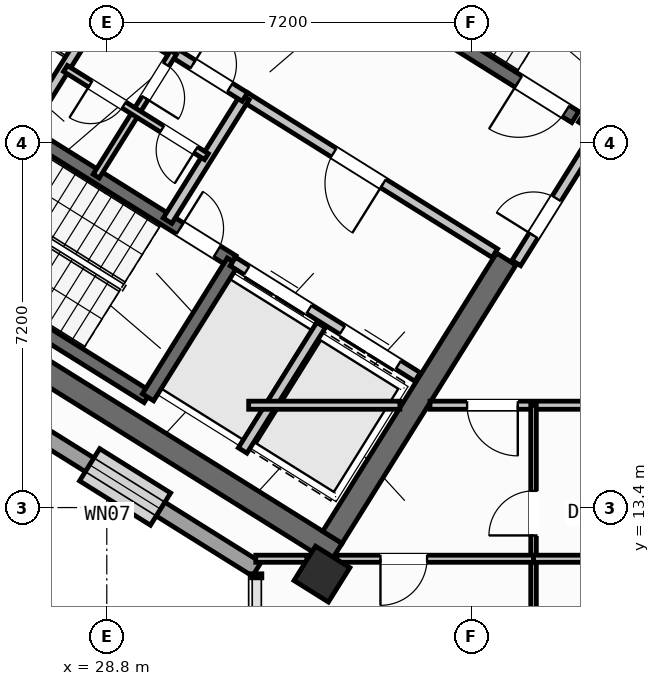
"""IFC4 building model, lengths in metres.
Left out: names, types, materials, properties, quantities, classifications, styles, units other than length and angle.
Written with IfcOpenShell. Run it as: python <this file> out.ifc"""

import sys

from ifc_helpers import new_model, si_unit, direction, frame, frame_2d, origin, origin_2d, place, context, subcontext, project, spatial, rectangle, hollow_rectangle, extrude, source, transform, mapped, element, fill, save


model = new_model("IFC4")
c1 = context("Model", 3, precision=1e-05, world=origin(), true_north=direction((0.0, 1.0)))
c2 = subcontext(c1, "Body", "Model", "MODEL_VIEW")
j1 = project(units=[si_unit("LENGTHUNIT", "METRE"), si_unit("PLANEANGLEUNIT", "RADIAN")], contexts=[c1])
p1 = place(None, origin())
s1 = spatial("IfcSite", under=j1, at=p1, CompositionType="ELEMENT")
p2 = place(p1, origin())
s2 = spatial("IfcBuilding", under=s1, at=p2, CompositionType="ELEMENT")
p3 = place(p2, frame((0.0, 0.0, 218.4)))
s3 = spatial("IfcBuildingStorey", under=s2, at=p3, CompositionType="ELEMENT", Elevation=218.4)
p4 = place(p3, frame((33.324, 12.503, 0.0), z_axis=(0.0, 0.0, 1.0), x_axis=(-0.848043529849, 0.529926571782, 0.0)))
e1 = element("IfcWall", 1, at=p4, inside=s3, PredefinedType="SHEAR", context=c2, shape_type="SweptSolid", body=[
    extrude(rectangle(XDim=13.04, YDim=0.45, at=frame_2d((6.52, 0.0))), origin(), (0.0, 0.0, 1.0), 3.35),
])
p5 = place(p3, frame((40.221, 23.965, 0.0), z_axis=(0.0, 0.0, 1.0), x_axis=(-0.529902075036, -0.848058836916, 0.0)))
e2 = element("IfcWall", 2, at=p5, inside=s3, PredefinedType="SHEAR", context=c2, shape_type="SweptSolid", body=[
    extrude(rectangle(XDim=3.625, YDim=0.45, at=frame_2d((1.812, 0.0))), origin(), (0.0, 0.0, 1.0), 3.35),
])
p6 = place(p3, frame((36.683, 18.304, 0.0), z_axis=(0.0, 0.0, 1.0), x_axis=(-0.529904039071, -0.848057609704, 0.0)))
e3 = element("IfcWall", 3, at=p6, inside=s3, PredefinedType="SHEAR", context=c2, shape_type="SweptSolid", body=[
    extrude(rectangle(XDim=6.475, YDim=0.45, at=frame_2d((3.238, 0.0))), origin(), (0.0, 0.0, 1.0), 3.35),
])
m1 = source(origin(), c2, "Body", "SweptSolid", [
    extrude(hollow_rectangle(XDim=0.8, YDim=0.8, WallThickness=0.032, at=origin_2d()), origin(), (0.0, 0.0, 1.0), 3.6),
])
p7 = place(p3, frame((33.046, 12.087, 0.0), z_axis=(0.0, 0.0, 1.0), x_axis=(-0.848048096156, 0.529919264233, 0.0)))
e4 = element("IfcColumn", 4, at=p7, inside=s3, PredefinedType="COLUMN", context=c2, shape_type="MappedRepresentation", body=[
    mapped(m1, transform((0.0, 0.0, 0.0), scale=1.0)),
])
p8 = place(p3, frame((31.76, 12.183, 0.0), z_axis=(0.0, 0.0, 1.0), x_axis=(-0.848047074256, 0.529920899612, 0.0)))
e5 = element("IfcWall", 5, at=p8, inside=s3, PredefinedType="STANDARD", context=c2, shape_type="SweptSolid", body=[
    extrude(rectangle(XDim=30.652, YDim=0.32, at=frame_2d((15.326, 0.0))), origin(), (0.0, 0.0, 1.0), 3.35),
])
p9 = place(p8, frame((15.166, 0.0, 0.0)))
e6 = element("IfcOpeningElement", 6, at=p9, cuts=e5, PredefinedType="OPENING", context=c2, shape_type="SweptSolid", body=[
    extrude(rectangle(XDim=1.2, YDim=2.15, at=frame_2d((0.6, 1.075))), frame((0.0, 0.17, 0.0), z_axis=(0.0, -1.0, 0.0), x_axis=(1.0, 0.0, 0.0)), (0.0, 0.0, 1.0), 0.34),
])
p10 = place(p8, frame((2.24, 0.0, 0.9)))
e7 = element("IfcOpeningElement", 7, at=p10, cuts=e5, PredefinedType="OPENING", context=c2, shape_type="SweptSolid", body=[
    extrude(rectangle(XDim=1.65, YDim=1.45, at=frame_2d((0.825, 0.725))), frame((0.0, 0.17, 0.0), z_axis=(0.0, -1.0, 0.0), x_axis=(1.0, 0.0, 0.0)), (0.0, 0.0, 1.0), 0.34),
])
p11 = place(p8, frame((7.469, 0.0, 0.9)))
e8 = element("IfcOpeningElement", 8, at=p11, cuts=e5, PredefinedType="OPENING", context=c2, shape_type="SweptSolid", body=[
    extrude(rectangle(XDim=1.65, YDim=1.45, at=frame_2d((0.825, 0.725))), frame((0.0, 0.17, 0.0), z_axis=(0.0, -1.0, 0.0), x_axis=(1.0, 0.0, 0.0)), (0.0, 0.0, 1.0), 0.34),
])
p12 = place(p8, frame((12.623, 0.0, 1.0)))
e9 = element("IfcOpeningElement", 9, at=p12, cuts=e5, PredefinedType="OPENING", context=c2, shape_type="SweptSolid", body=[
    extrude(rectangle(XDim=0.9, YDim=1.25, at=frame_2d((0.45, 0.625))), frame((0.0, 0.17, 0.0), z_axis=(0.0, -1.0, 0.0), x_axis=(1.0, 0.0, 0.0)), (0.0, 0.0, 1.0), 0.34),
])
p13 = place(p8, frame((19.583, 0.0, 1.0)))
e10 = element("IfcOpeningElement", 10, at=p13, cuts=e5, PredefinedType="OPENING", context=c2, shape_type="SweptSolid", body=[
    extrude(rectangle(XDim=0.9, YDim=1.25, at=frame_2d((0.45, 0.625))), frame((0.0, 0.17, 0.0), z_axis=(0.0, -1.0, 0.0), x_axis=(1.0, 0.0, 0.0)), (0.0, 0.0, 1.0), 0.34),
])
p14 = place(p8, frame((22.033, 0.0, 1.0)))
e11 = element("IfcOpeningElement", 11, at=p14, cuts=e5, PredefinedType="OPENING", context=c2, shape_type="SweptSolid", body=[
    extrude(rectangle(XDim=0.9, YDim=1.25, at=frame_2d((0.45, 0.625))), frame((0.0, 0.17, 0.0), z_axis=(0.0, -1.0, 0.0), x_axis=(1.0, 0.0, 0.0)), (0.0, 0.0, 1.0), 0.34),
])
p15 = place(p8, frame((27.666, 0.0, 0.9)))
e12 = element("IfcOpeningElement", 12, at=p15, cuts=e5, PredefinedType="OPENING", context=c2, shape_type="SweptSolid", body=[
    extrude(rectangle(XDim=1.35, YDim=1.45, at=frame_2d((0.675, 0.725))), frame((0.0, 0.17, 0.0), z_axis=(0.0, -1.0, 0.0), x_axis=(1.0, 0.0, 0.0)), (0.0, 0.0, 1.0), 0.34),
])
p16 = place(p3, frame((29.605, 15.581, 0.0), z_axis=(0.0, 0.0, 1.0), x_axis=(-0.848036911448, 0.529937163087, 0.0)))
e13 = element("IfcWall", 13, at=p16, inside=s3, PredefinedType="SHEAR", context=c2, shape_type="SweptSolid", body=[
    extrude(rectangle(XDim=7.46, YDim=0.26, at=frame_2d((3.73, 0.0))), origin(), (0.0, 0.0, 1.0), 3.35),
])
p17 = place(p3, frame((31.28, 18.261, 0.0), z_axis=(0.0, 0.0, 1.0), x_axis=(-0.848051618787, 0.529913626805, 0.0)))
e14 = element("IfcWall", 14, at=p17, inside=s3, PredefinedType="SHEAR", context=c2, shape_type="SweptSolid", body=[
    extrude(rectangle(XDim=7.46, YDim=0.26, at=frame_2d((3.73, 0.0))), origin(), (0.0, 0.0, 1.0), 3.35),
])
p18 = place(p17, frame((0.36, 0.0, 0.0)))
e15 = element("IfcOpeningElement", 15, at=p18, cuts=e14, PredefinedType="OPENING", context=c2, shape_type="SweptSolid", body=[
    extrude(rectangle(XDim=0.86, YDim=2.05, at=frame_2d((0.43, 1.025))), frame((0.0, 0.14, 0.0), z_axis=(0.0, -1.0, 0.0), x_axis=(1.0, 0.0, 0.0)), (0.0, 0.0, 1.0), 0.28),
])
p19 = place(p3, frame((31.288, 18.256, 0.0), z_axis=(0.0, 0.0, 1.0), x_axis=(-0.529943379326, -0.848033026897, 0.0)))
e16 = element("IfcWall", 16, at=p19, inside=s3, PredefinedType="SHEAR", context=c2, shape_type="SweptSolid", body=[
    extrude(rectangle(XDim=3.16, YDim=0.26, at=frame_2d((1.58, 0.0))), origin(), (0.0, 0.0, 1.0), 3.35),
])
p20 = place(p3, frame((38.046, 21.108, 0.0), z_axis=(0.0, 0.0, 1.0), x_axis=(-0.848054434086, 0.529909121291, 0.0)))
e17 = element("IfcWall", 17, at=p20, inside=s3, PredefinedType="SHEAR", context=c2, shape_type="SweptSolid", body=[
    extrude(rectangle(XDim=7.33, YDim=0.26, at=frame_2d((3.665, 0.0))), origin(), (0.0, 0.0, 1.0), 3.35),
])
p21 = place(p20, frame((0.22, 0.0, 0.0)))
e18 = element("IfcOpeningElement", 18, at=p21, cuts=e17, PredefinedType="OPENING", context=c2, shape_type="SweptSolid", body=[
    extrude(rectangle(XDim=1.1, YDim=2.1, at=frame_2d((0.55, 1.05))), frame((0.0, 0.14, 0.0), z_axis=(0.0, -1.0, 0.0), x_axis=(1.0, 0.0, 0.0)), (0.0, 0.0, 1.0), 0.28),
])
p22 = place(p3, frame((34.933, 15.978, 0.0), z_axis=(0.0, 0.0, 1.0), x_axis=(-0.848055739377, 0.529907032327, 0.0)))
e19 = element("IfcWall", 19, at=p22, inside=s3, PredefinedType="STANDARD", context=c2, shape_type="SweptSolid", body=[
    extrude(rectangle(XDim=4.298, YDim=0.2, at=frame_2d((2.149, 0.0))), origin(), (0.0, 0.0, 1.0), 3.34),
])
p23 = place(p22, frame((0.448, 0.0, 0.0)))
e20 = element("IfcOpeningElement", 20, at=p23, cuts=e19, PredefinedType="OPENING", context=c2, shape_type="SweptSolid", body=[
    extrude(rectangle(XDim=1.3, YDim=2.2, at=frame_2d((0.65, 1.1))), frame((0.0, 0.11, 0.0), z_axis=(0.0, -1.0, 0.0), x_axis=(1.0, 0.0, 0.0)), (0.0, 0.0, 1.0), 0.22),
])
p24 = place(p22, frame((2.523, 0.0, 0.0)))
e21 = element("IfcOpeningElement", 21, at=p24, cuts=e19, PredefinedType="OPENING", context=c2, shape_type="SweptSolid", body=[
    extrude(rectangle(XDim=1.45, YDim=2.25, at=frame_2d((0.725, 1.125))), frame((0.0, 0.11, 0.0), z_axis=(0.0, -1.0, 0.0), x_axis=(1.0, 0.0, 0.0)), (0.0, 0.0, 1.0), 0.22),
])
p25 = place(p3, frame((36.459, 18.421, 0.0), z_axis=(0.0, 0.0, 1.0), x_axis=(-0.848059591691, 0.529900867089, 0.0)))
e22 = element("IfcWall", 22, at=p25, inside=s3, PredefinedType="STANDARD", context=c2, shape_type="SweptSolid", body=[
    extrude(rectangle(XDim=5.818, YDim=0.2, at=frame_2d((2.909, 0.0))), origin(), (0.0, 0.0, 1.0), 3.34),
])
p26 = place(p25, frame((2.598, 0.0, 0.0)))
e23 = element("IfcOpeningElement", 23, at=p26, cuts=e22, PredefinedType="OPENING", context=c2, shape_type="SweptSolid", body=[
    extrude(rectangle(XDim=1.15, YDim=2.1, at=frame_2d((0.575, 1.05))), frame((0.0, 0.11, 0.0), z_axis=(0.0, -1.0, 0.0), x_axis=(1.0, 0.0, 0.0)), (0.0, 0.0, 1.0), 0.22),
])
p27 = place(p3, frame((33.029, 17.003, 0.0), z_axis=(0.0, 0.0, 1.0), x_axis=(-0.529916267533, -0.848049968695, 0.0)))
e24 = element("IfcWall", 24, at=p27, inside=s3, PredefinedType="STANDARD", context=c2, shape_type="SweptSolid", body=[
    extrude(rectangle(XDim=2.92, YDim=0.2, at=frame_2d((1.46, 0.0))), origin(), (0.0, 0.0, 1.0), 3.34),
])
for number, where, z_axis, x_axis in (
    (25, (31.525, 21.504, 0.0), (0.0, 0.0, 1.0), (-0.53, -0.848, 0.0)),
    (26, (28.71, 23.263, 0.0), (0.0, 0.0, 1.0), (-0.53, -0.848, 0.0)),
):
    element("IfcWall", number, at=place(p3, frame(where, z_axis=z_axis, x_axis=x_axis)), inside=s3, PredefinedType="STANDARD", context=c2, shape_type="SweptSolid", body=[
        extrude(rectangle(XDim=2.88, YDim=0.2, at=frame_2d((1.44, 0.0))), origin(), (0.0, 0.0, 1.0), 3.34),
    ])
p28 = place(p3, frame((31.525, 21.504, 0.0), z_axis=(0.0, 0.0, 1.0), x_axis=(-0.848042066329, 0.529928913853, 0.0)))
e27 = element("IfcWall", 27, at=p28, inside=s3, PredefinedType="STANDARD", context=c2, shape_type="SweptSolid", body=[
    extrude(rectangle(XDim=6.268, YDim=0.2, at=frame_2d((3.134, 0.0))), origin(), (0.0, 0.0, 1.0), 3.34),
])
p29 = place(p28, frame((4.4, 0.0, 0.0)))
e28 = element("IfcOpeningElement", 28, at=p29, cuts=e27, PredefinedType="OPENING", context=c2, shape_type="SweptSolid", body=[
    extrude(rectangle(XDim=0.86, YDim=2.05, at=frame_2d((0.43, 1.025))), frame((0.0, 0.11, 0.0), z_axis=(0.0, -1.0, 0.0), x_axis=(1.0, 0.0, 0.0)), (0.0, 0.0, 1.0), 0.22),
])
p30 = place(p28, frame((0.35, 0.0, 0.0)))
e29 = element("IfcOpeningElement", 29, at=p30, cuts=e27, PredefinedType="OPENING", context=c2, shape_type="SweptSolid", body=[
    extrude(rectangle(XDim=0.86, YDim=2.05, at=frame_2d((0.43, 1.025))), frame((0.0, 0.11, 0.0), z_axis=(0.0, -1.0, 0.0), x_axis=(1.0, 0.0, 0.0)), (0.0, 0.0, 1.0), 0.22),
])
p31 = place(p3, frame((30.117, 22.384, 0.0), z_axis=(0.0, 0.0, 1.0), x_axis=(-0.529951914384, -0.848027693204, 0.0)))
e30 = element("IfcWall", 30, at=p31, inside=s3, PredefinedType="PLUMBINGWALL", context=c2, shape_type="SweptSolid", body=[
    extrude(rectangle(XDim=1.4, YDim=0.14, at=frame_2d((0.7, 0.0))), origin(), (0.0, 0.0, 1.0), 3.34),
])
p32 = place(p31, frame((0.28, 0.0, 0.0)))
e31 = element("IfcOpeningElement", 31, at=p32, cuts=e30, PredefinedType="OPENING", context=c2, shape_type="SweptSolid", body=[
    extrude(rectangle(XDim=0.78, YDim=2.05, at=frame_2d((0.39, 1.025))), frame((0.0, 0.08, 0.0), z_axis=(0.0, -1.0, 0.0), x_axis=(1.0, 0.0, 0.0)), (0.0, 0.0, 1.0), 0.16),
])
p33 = place(p3, frame((29.375, 21.196, 0.0), z_axis=(0.0, 0.0, 1.0), x_axis=(-0.529865479138, -0.848081702443, 0.0)))
e32 = element("IfcWall", 32, at=p33, inside=s3, PredefinedType="PLUMBINGWALL", context=c2, shape_type="SweptSolid", body=[
    extrude(rectangle(XDim=1.48, YDim=0.14, at=frame_2d((0.74, 0.0))), origin(), (0.0, 0.0, 1.0), 3.34),
])
p34 = place(p3, frame((30.766, 20.327, 0.0), z_axis=(0.0, 0.0, 1.0), x_axis=(-0.848052663127, 0.529911955482, 0.0)))
e33 = element("IfcWall", 33, at=p34, inside=s3, PredefinedType="PLUMBINGWALL", context=c2, shape_type="SweptSolid", body=[
    extrude(rectangle(XDim=3.28, YDim=0.14, at=frame_2d((1.64, 0.0))), origin(), (0.0, 0.0, 1.0), 3.34),
])
p35 = place(p34, frame((0.25, 0.0, 0.0)))
e34 = element("IfcOpeningElement", 34, at=p35, cuts=e33, PredefinedType="OPENING", context=c2, shape_type="SweptSolid", body=[
    extrude(rectangle(XDim=0.78, YDim=2.05, at=frame_2d((0.39, 1.025))), frame((0.0, 0.08, 0.0), z_axis=(0.0, -1.0, 0.0), x_axis=(1.0, 0.0, 0.0)), (0.0, 0.0, 1.0), 0.16),
])
p36 = place(p34, frame((1.92, 0.0, 0.0)))
e35 = element("IfcOpeningElement", 35, at=p36, cuts=e33, PredefinedType="OPENING", context=c2, shape_type="SweptSolid", body=[
    extrude(rectangle(XDim=0.78, YDim=2.05, at=frame_2d((0.39, 1.025))), frame((0.0, 0.08, 0.0), z_axis=(0.0, -1.0, 0.0), x_axis=(1.0, 0.0, 0.0)), (0.0, 0.0, 1.0), 0.16),
])
p37 = place(p3, frame((38.451, 20.737, 0.0), z_axis=(0.0, 0.0, 1.0), x_axis=(-0.529924799939, -0.848044637038, 0.0)))
e36 = element("IfcWall", 36, at=p37, inside=s3, PredefinedType="STANDARD", context=c2, shape_type="SweptSolid", body=[
    extrude(rectangle(XDim=2.96, YDim=0.2, at=frame_2d((1.48, 0.0))), origin(), (0.0, 0.0, 1.0), 3.34),
])
p38 = place(p37, frame((1.46, 0.0, 0.0)))
e37 = element("IfcOpeningElement", 37, at=p38, cuts=e36, PredefinedType="OPENING", context=c2, shape_type="SweptSolid", body=[
    extrude(rectangle(XDim=0.86, YDim=2.05, at=frame_2d((0.43, 1.025))), frame((0.0, 0.11, 0.0), z_axis=(0.0, -1.0, 0.0), x_axis=(1.0, 0.0, 0.0)), (0.0, 0.0, 1.0), 0.22),
])
p39 = place(p3, frame((31.6, 15.42, 0.0), z_axis=(0.0, 0.0, 1.0), x_axis=(1.0, 0.0, 0.0)))
e38 = element("IfcWall", 38, at=p39, inside=s3, PredefinedType="PARTITIONING", context=c2, shape_type="SweptSolid", body=[
    extrude(rectangle(XDim=2.984, YDim=0.16, at=frame_2d((1.492, 0.0))), origin(), (0.0, 0.0, 1.0), 3.34),
])
p40 = place(p3, frame((35.178, 15.42, 0.0), z_axis=(0.0, 0.0, 1.0), x_axis=(1.0, 0.0, 0.0)))
e39 = element("IfcWall", 39, at=p40, inside=s3, PredefinedType="PARTITIONING", context=c2, shape_type="SweptSolid", body=[
    extrude(rectangle(XDim=15.552, YDim=0.16, at=frame_2d((7.776, 0.0))), origin(), (0.0, 0.0, 1.0), 3.34),
])
p41 = place(p40, frame((0.733, 0.0, 0.0)))
e40 = element("IfcOpeningElement", 40, at=p41, cuts=e39, PredefinedType="OPENING", context=c2, shape_type="SweptSolid", body=[
    extrude(rectangle(XDim=1.0, YDim=2.1, at=frame_2d((0.5, 1.05))), frame((0.0, 0.09, 0.0), z_axis=(0.0, -1.0, 0.0), x_axis=(1.0, 0.0, 0.0)), (0.0, 0.0, 1.0), 0.18),
])
p42 = place(p40, frame((9.153, 0.0, 0.0)))
e41 = element("IfcOpeningElement", 41, at=p42, cuts=e39, PredefinedType="OPENING", context=c2, shape_type="SweptSolid", body=[
    extrude(rectangle(XDim=1.0, YDim=2.1, at=frame_2d((0.5, 1.05))), frame((0.0, 0.09, 0.0), z_axis=(0.0, -1.0, 0.0), x_axis=(1.0, 0.0, 0.0)), (0.0, 0.0, 1.0), 0.18),
])
p43 = place(p3, frame((37.222, 1.96, 0.0), z_axis=(0.0, 0.0, 1.0), x_axis=(0.0, 1.0, 0.0)))
e42 = element("IfcWall", 42, at=p43, inside=s3, PredefinedType="PARTITIONING", context=c2, shape_type="SweptSolid", body=[
    extrude(rectangle(XDim=13.46, YDim=0.11, at=frame_2d((6.73, 0.0))), origin(), (0.0, 0.0, 1.0), 3.34),
])
p44 = place(p43, frame((5.2, 0.0, 0.0)))
e43 = element("IfcOpeningElement", 43, at=p44, cuts=e42, PredefinedType="OPENING", context=c2, shape_type="SweptSolid", body=[
    extrude(rectangle(XDim=0.92, YDim=2.08, at=frame_2d((0.46, 1.04))), frame((0.0, 0.065, 0.0), z_axis=(0.0, -1.0, 0.0), x_axis=(1.0, 0.0, 0.0)), (0.0, 0.0, 1.0), 0.13),
])
p45 = place(p43, frame((10.89, 0.0, 0.0)))
e44 = element("IfcOpeningElement", 44, at=p45, cuts=e42, PredefinedType="OPENING", context=c2, shape_type="SweptSolid", body=[
    extrude(rectangle(XDim=0.88, YDim=2.08, at=frame_2d((0.44, 1.04))), frame((0.0, 0.065, 0.0), z_axis=(0.0, -1.0, 0.0), x_axis=(1.0, 0.0, 0.0)), (0.0, 0.0, 1.0), 0.13),
])
p46 = place(p3, frame((31.74, 12.39, 0.0), z_axis=(0.0, 0.0, 1.0), x_axis=(1.0, 0.0, 0.0)))
e45 = element("IfcWall", 45, at=p46, inside=s3, PredefinedType="PLUMBINGWALL", context=c2, shape_type="SweptSolid", body=[
    extrude(rectangle(XDim=1.01, YDim=0.14, at=frame_2d((0.505, 0.0))), origin(), (0.0, 0.0, 1.0), 3.34),
])
p47 = place(p3, frame((33.339, 12.39, 0.0), z_axis=(0.0, 0.0, 1.0), x_axis=(1.0, 0.0, 0.0)))
e46 = element("IfcWall", 46, at=p47, inside=s3, PredefinedType="PLUMBINGWALL", context=c2, shape_type="SweptSolid", body=[
    extrude(rectangle(XDim=3.883, YDim=0.14, at=frame_2d((1.942, 0.0))), origin(), (0.0, 0.0, 1.0), 2.525),
])
p48 = place(p47, frame((0.863, 0.0, 0.0)))
e47 = element("IfcOpeningElement", 47, at=p48, cuts=e46, PredefinedType="OPENING", context=c2, shape_type="SweptSolid", body=[
    extrude(rectangle(XDim=0.92, YDim=2.08, at=frame_2d((0.46, 1.04))), frame((0.0, 0.08, 0.0), z_axis=(0.0, -1.0, 0.0), x_axis=(1.0, 0.0, 0.0)), (0.0, 0.0, 1.0), 0.16),
])
p49 = place(p3, frame((37.222, 12.39, 0.0), z_axis=(0.0, 0.0, 1.0), x_axis=(1.0, 0.0, 0.0)))
e48 = element("IfcWall", 48, at=p49, inside=s3, PredefinedType="PLUMBINGWALL", context=c2, shape_type="SweptSolid", body=[
    extrude(rectangle(XDim=4.728, YDim=0.14, at=frame_2d((2.364, 0.0))), origin(), (0.0, 0.0, 1.0), 2.525),
])
m2 = source(origin(), c2, "Body", "SweptSolid", [
    extrude(rectangle(XDim=1.65, YDim=1.45, at=frame_2d((0.825, 0.725))), frame((0.0, 0.03, 0.0), z_axis=(0.0, -1.0, 0.0), x_axis=(1.0, 0.0, 0.0)), (0.0, 0.0, 1.0), 0.06),
])
p50 = place(p10, origin())
e49 = element("IfcWindow", 49, at=p50, inside=s3, PartitioningType="SINGLE_PANEL", PredefinedType="WINDOW", context=c2, shape_type="MappedRepresentation", body=[
    mapped(m2, transform((0.0, 0.0, 0.0), scale=1.0)),
])
fill(e7, e49)
m3 = source(origin(), c2, "Body", "SweptSolid", [
    extrude(rectangle(XDim=0.86, YDim=2.05, at=frame_2d((0.43, 1.025))), frame((0.0, 0.025, 0.0), z_axis=(0.0, -1.0, 0.0), x_axis=(1.0, 0.0, 0.0)), (0.0, 0.0, 1.0), 0.05),
])
p51 = place(p18, frame((0.86, 0.0, 0.0), z_axis=(0.0, 0.0, 1.0), x_axis=(-1.0, 0.0, 0.0)))
e50 = element("IfcDoor", 50, at=p51, inside=s3, OperationType="SINGLE_SWING_LEFT", PredefinedType="DOOR", context=c2, shape_type="MappedRepresentation", body=[
    mapped(m3, transform((0.0, 0.0, 0.0), scale=1.0)),
])
fill(e15, e50)
m4 = source(origin(), c2, "Body", "SweptSolid", [
    extrude(rectangle(XDim=1.1, YDim=2.1, at=frame_2d((0.55, 1.05))), frame((0.0, 0.025, 0.0), z_axis=(0.0, -1.0, 0.0), x_axis=(1.0, 0.0, 0.0)), (0.0, 0.0, 1.0), 0.05),
])
p52 = place(p21, origin())
e51 = element("IfcDoor", 51, at=p52, inside=s3, OperationType="SINGLE_SWING_RIGHT", PredefinedType="DOOR", context=c2, shape_type="MappedRepresentation", body=[
    mapped(m4, transform((0.0, 0.0, 0.0), scale=1.0)),
])
fill(e18, e51)
m5 = source(origin(), c2, "Body", "SweptSolid", [
    extrude(rectangle(XDim=1.15, YDim=2.1, at=frame_2d((0.575, 1.05))), frame((0.0, 0.025, 0.0), z_axis=(0.0, -1.0, 0.0), x_axis=(1.0, 0.0, 0.0)), (0.0, 0.0, 1.0), 0.05),
])
p53 = place(p26, origin())
e52 = element("IfcDoor", 52, at=p53, inside=s3, OperationType="SINGLE_SWING_LEFT", PredefinedType="DOOR", context=c2, shape_type="MappedRepresentation", body=[
    mapped(m5, transform((0.0, 0.0, 0.0), scale=1.0)),
])
fill(e23, e52)
m6 = source(origin(), c2, "Body", "SweptSolid", [
    extrude(rectangle(XDim=1.3, YDim=2.2, at=frame_2d((0.65, 1.1))), frame((0.0, 0.025, 0.0), z_axis=(0.0, -1.0, 0.0), x_axis=(1.0, 0.0, 0.0)), (0.0, 0.0, 1.0), 0.05),
])
p54 = place(p23, origin())
e53 = element("IfcDoor", 53, at=p54, inside=s3, OperationType="DOUBLE_DOOR_SLIDING", PredefinedType="DOOR", context=c2, shape_type="MappedRepresentation", body=[
    mapped(m6, transform((0.0, 0.0, 0.0), scale=1.0)),
])
fill(e20, e53)
m7 = source(origin(), c2, "Body", "SweptSolid", [
    extrude(rectangle(XDim=1.45, YDim=2.25, at=frame_2d((0.725, 1.125))), frame((0.0, 0.025, 0.0), z_axis=(0.0, -1.0, 0.0), x_axis=(1.0, 0.0, 0.0)), (0.0, 0.0, 1.0), 0.05),
])
p55 = place(p24, origin())
e54 = element("IfcDoor", 54, at=p55, inside=s3, OperationType="DOUBLE_DOOR_SLIDING", PredefinedType="DOOR", context=c2, shape_type="MappedRepresentation", body=[
    mapped(m7, transform((0.0, 0.0, 0.0), scale=1.0)),
])
fill(e21, e54)
p56 = place(p30, frame((0.86, 0.0, 0.0), z_axis=(0.0, 0.0, 1.0), x_axis=(-1.0, 0.0, 0.0)))
e55 = element("IfcDoor", 55, at=p56, inside=s3, OperationType="SINGLE_SWING_LEFT", PredefinedType="DOOR", context=c2, shape_type="MappedRepresentation", body=[
    mapped(m3, transform((0.0, 0.0, 0.0), scale=1.0)),
])
fill(e29, e55)
m8 = source(origin(), c2, "Body", "SweptSolid", [
    extrude(rectangle(XDim=0.78, YDim=2.05, at=frame_2d((0.39, 1.025))), frame((0.0, 0.025, 0.0), z_axis=(0.0, -1.0, 0.0), x_axis=(1.0, 0.0, 0.0)), (0.0, 0.0, 1.0), 0.05),
])
p57 = place(p32, origin())
e56 = element("IfcDoor", 56, at=p57, inside=s3, OperationType="SINGLE_SWING_RIGHT", PredefinedType="DOOR", context=c2, shape_type="MappedRepresentation", body=[
    mapped(m8, transform((0.0, 0.0, 0.0), scale=1.0)),
])
fill(e31, e56)
p58 = place(p35, origin())
e57 = element("IfcDoor", 57, at=p58, inside=s3, OperationType="SINGLE_SWING_LEFT", PredefinedType="DOOR", context=c2, shape_type="MappedRepresentation", body=[
    mapped(m8, transform((0.0, 0.0, 0.0), scale=1.0)),
])
fill(e34, e57)
p59 = place(p36, origin())
e58 = element("IfcDoor", 58, at=p59, inside=s3, OperationType="SINGLE_SWING_RIGHT", PredefinedType="DOOR", context=c2, shape_type="MappedRepresentation", body=[
    mapped(m8, transform((0.0, 0.0, 0.0), scale=1.0)),
])
fill(e35, e58)
p60 = place(p38, frame((0.86, 0.0, 0.0), z_axis=(0.0, 0.0, 1.0), x_axis=(-1.0, 0.0, 0.0)))
e59 = element("IfcDoor", 59, at=p60, inside=s3, OperationType="SINGLE_SWING_LEFT", PredefinedType="DOOR", context=c2, shape_type="MappedRepresentation", body=[
    mapped(m3, transform((0.0, 0.0, 0.0), scale=1.0)),
])
fill(e37, e59)
m9 = source(origin(), c2, "Body", "SweptSolid", [
    extrude(rectangle(XDim=1.0, YDim=2.1, at=frame_2d((0.5, 1.05))), frame((0.0, 0.025, 0.0), z_axis=(0.0, -1.0, 0.0), x_axis=(1.0, 0.0, 0.0)), (0.0, 0.0, 1.0), 0.05),
])
p61 = place(p41, frame((1.0, 0.0, 0.0), z_axis=(0.0, 0.0, 1.0), x_axis=(-1.0, 0.0, 0.0)))
e60 = element("IfcDoor", 60, at=p61, inside=s3, OperationType="SINGLE_SWING_LEFT", PredefinedType="DOOR", context=c2, shape_type="MappedRepresentation", body=[
    mapped(m9, transform((0.0, 0.0, 0.0), scale=1.0)),
])
fill(e40, e60)
m10 = source(origin(), c2, "Body", "SweptSolid", [
    extrude(rectangle(XDim=0.92, YDim=2.08, at=frame_2d((0.46, 1.04))), frame((0.0, 0.025, 0.0), z_axis=(0.0, -1.0, 0.0), x_axis=(1.0, 0.0, 0.0)), (0.0, 0.0, 1.0), 0.05),
])
p62 = place(p48, frame((0.92, 0.0, 0.0), z_axis=(0.0, 0.0, 1.0), x_axis=(-1.0, 0.0, 0.0)))
e61 = element("IfcDoor", 61, at=p62, inside=s3, OperationType="SINGLE_SWING_RIGHT", PredefinedType="DOOR", context=c2, shape_type="MappedRepresentation", body=[
    mapped(m10, transform((0.0, 0.0, 0.0), scale=1.0)),
])
fill(e47, e61)
m11 = source(origin(), c2, "Body", "SweptSolid", [
    extrude(rectangle(XDim=0.88, YDim=2.08, at=frame_2d((0.44, 1.04))), frame((0.0, 0.025, 0.0), z_axis=(0.0, -1.0, 0.0), x_axis=(1.0, 0.0, 0.0)), (0.0, 0.0, 1.0), 0.05),
])
p63 = place(p45, origin())
e62 = element("IfcDoor", 62, at=p63, inside=s3, OperationType="SINGLE_SWING_LEFT", PredefinedType="DOOR", context=c2, shape_type="MappedRepresentation", body=[
    mapped(m11, transform((0.0, 0.0, 0.0), scale=1.0)),
])
fill(e44, e62)
save(model, sys.argv[1])
